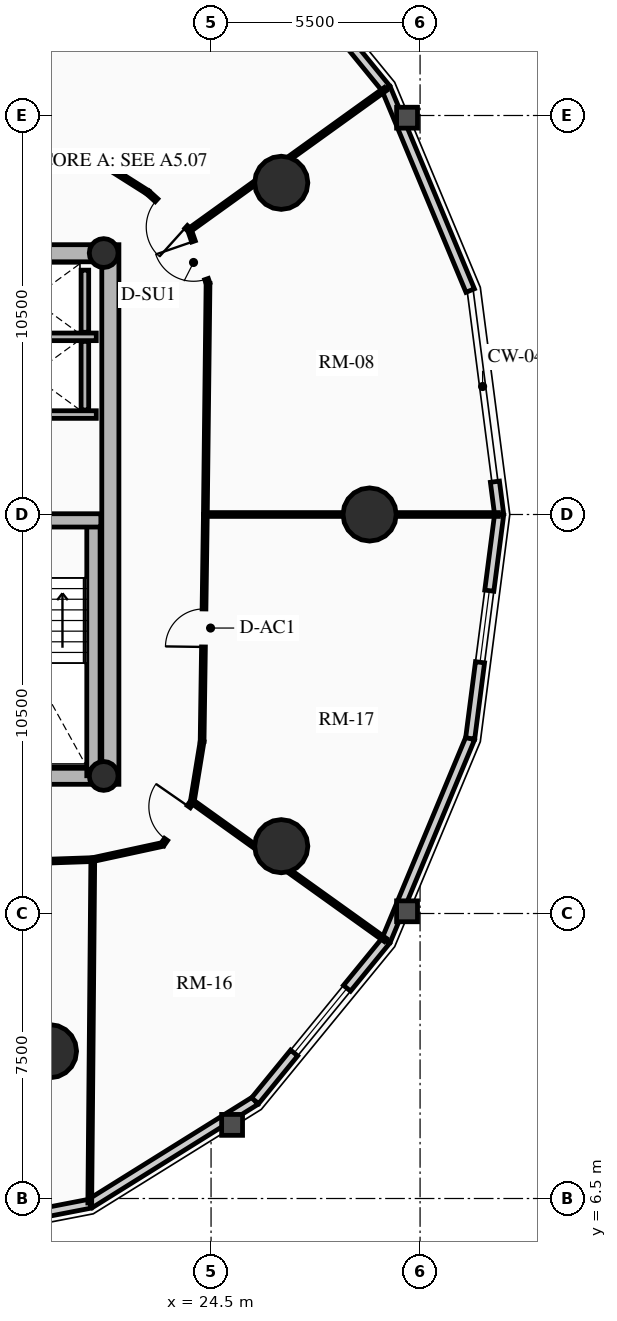
"""IFC4 building model, lengths in metres.
Left out: names, types, materials, properties, quantities, classifications, styles, units other than length and angle.
Written with IfcOpenShell. Run it as: python <this file> out.ifc"""

import sys

from ifc_helpers import new_model, si_unit, direction, frame, frame_2d, origin, origin_2d, place, context, subcontext, project, spatial, rectangle, circle, hollow_circle, extrude, source, transform, mapped, element, fill, save


model = new_model("IFC4")
c1 = context("Model", 3, precision=1e-05, world=origin(), true_north=direction((0.0, 1.0)))
c2 = subcontext(c1, "Body", "Model", "MODEL_VIEW")
j1 = project(units=[si_unit("LENGTHUNIT", "METRE"), si_unit("PLANEANGLEUNIT", "RADIAN")], contexts=[c1])
p1 = place(None, origin())
s1 = spatial("IfcSite", under=j1, at=p1, CompositionType="ELEMENT")
p2 = place(p1, origin())
s2 = spatial("IfcBuilding", under=s1, at=p2, CompositionType="ELEMENT")
p3 = place(p2, frame((0.0, 0.0, 99.25)))
s3 = spatial("IfcBuildingStorey", under=s2, at=p3, CompositionType="ELEMENT", Elevation=99.25)
p4 = place(p3, frame((21.85, 17.4, 0.0), z_axis=(0.0, 0.0, 1.0), x_axis=(0.0, 1.0, 0.0)))
e1 = element("IfcWall", 1, at=p4, inside=s3, PredefinedType="SHEAR", context=c2, shape_type="SweptSolid", body=[
    extrude(rectangle(XDim=14.2, YDim=0.45, at=frame_2d((7.1, 0.0))), origin(), (0.0, 0.0, 1.0), 2.91),
])
p5 = place(p3, frame((11.15, 17.625, 0.0), z_axis=(0.0, 0.0, 1.0), x_axis=(1.0, 0.0, 0.0)))
e2 = element("IfcWall", 2, at=p5, inside=s3, PredefinedType="SHEAR", context=c2, shape_type="SweptSolid", body=[
    extrude(rectangle(XDim=10.7, YDim=0.45, at=frame_2d((5.35, 0.0))), origin(), (0.0, 0.0, 1.0), 2.91),
])
m1 = source(origin(), c2, "Body", "SweptSolid", [
    extrude(rectangle(XDim=1.5, YDim=2.02, at=frame_2d((0.75, 1.01))), frame((0.0, 0.235, 0.0), z_axis=(0.0, -1.0, 0.0), x_axis=(1.0, 0.0, 0.0)), (0.0, 0.0, 1.0), 0.47),
])
p6 = place(p5, frame((5.45, 0.0, 0.0)))
e3 = element("IfcOpeningElement", 3, at=p6, cuts=e2, PredefinedType="OPENING", context=c2, shape_type="MappedRepresentation", body=[
    mapped(m1, transform((0.0, 0.0, 0.0), x_axis=(1.0, 0.0, 0.0), y_axis=(0.0, 1.0, 0.0), z_axis=(0.0, 0.0, 1.0), scale=1.0)),
])
p7 = place(p3, frame((11.15, 31.375, 0.0), z_axis=(0.0, 0.0, 1.0), x_axis=(1.0, 0.0, 0.0)))
e4 = element("IfcWall", 4, at=p7, inside=s3, PredefinedType="SHEAR", context=c2, shape_type="SweptSolid", body=[
    extrude(rectangle(XDim=10.7, YDim=0.45, at=frame_2d((5.35, 0.0))), origin(), (0.0, 0.0, 1.0), 2.91),
])
p8 = place(p7, frame((4.6, 0.0, 0.0)))
e5 = element("IfcOpeningElement", 5, at=p8, cuts=e4, PredefinedType="OPENING", context=c2, shape_type="MappedRepresentation", body=[
    mapped(m1, transform((0.0, 0.0, 0.0), x_axis=(1.0, 0.0, 0.0), y_axis=(0.0, 1.0, 0.0), z_axis=(0.0, 0.0, 1.0), scale=1.0)),
])
p9 = place(p3, frame((21.405, 17.625, 0.0), z_axis=(0.0, 0.0, 1.0), x_axis=(0.0, 1.0, 0.0)))
e6 = element("IfcWall", 6, at=p9, inside=s3, PredefinedType="SHEAR", context=c2, shape_type="SweptSolid", body=[
    extrude(rectangle(XDim=6.72, YDim=0.35, at=frame_2d((3.36, 0.0))), origin(), (0.0, 0.0, 1.0), 2.91),
])
p10 = place(p3, frame((18.315, 24.345, 0.0), z_axis=(0.0, 0.0, 1.0), x_axis=(1.0, 0.0, 0.0)))
e7 = element("IfcWall", 7, at=p10, inside=s3, PredefinedType="SHEAR", context=c2, shape_type="SweptSolid", body=[
    extrude(rectangle(XDim=3.285, YDim=0.35, at=frame_2d((1.643, 0.0))), origin(), (0.0, 0.0, 1.0), 2.91),
])
for number, where, z_axis, x_axis in (
    (8, (21.675, 17.62, 0.0), (0.0, 0.0, 1.0), (1.0, 0.0, 0.0)),
    (9, (21.675, 31.38, 0.0), (0.0, 0.0, 1.0), (1.0, 0.0, 0.0)),
):
    element("IfcColumn", number, at=place(p3, frame(where, z_axis=z_axis, x_axis=x_axis)), inside=s3, PredefinedType="COLUMN", context=c2, shape_type="SweptSolid", body=[
        extrude(hollow_circle(Radius=0.38, WallThickness=0.032, at=origin_2d()), origin(), (0.0, 0.0, 1.0), 2.91),
    ])
for number, where, z_axis, x_axis in (
    (10, (28.672, 24.5, 0.0), (0.0, 0.0, 1.0), (1.0, 0.0, 0.0)),
    (11, (26.347, 33.229, 0.0), (0.0, 0.0, 1.0), (1.0, 0.0, 0.0)),
    (12, (20.261, 10.377, 0.0), (0.0, 0.0, 1.0), (1.0, 0.0, 0.0)),
    (13, (26.347, 15.771, 0.0), (0.0, 0.0, 1.0), (1.0, 0.0, 0.0)),
):
    element("IfcColumn", number, at=place(p3, frame(where, z_axis=z_axis, x_axis=x_axis)), inside=s3, PredefinedType="USERDEFINED", context=c2, shape_type="SweptSolid", body=[
        extrude(circle(Radius=0.7, at=origin_2d()), origin(), (0.0, 0.0, 1.0), 2.91),
    ])
p11 = place(p3, frame((31.969, 25.363, 0.0), z_axis=(0.0, 0.0, 1.0), x_axis=(0.128523364007, -0.991706481225, 0.0)))
e14 = element("IfcWall", 14, at=p11, inside=s3, PredefinedType="SOLIDWALL", context=c2, shape_type="SweptSolid", body=[
    extrude(rectangle(XDim=0.87, YDim=0.24, at=frame_2d((0.435, 0.0))), origin(), (0.0, 0.0, 1.0), 2.655),
])
p12 = place(p3, frame((29.105, 35.709, 0.0), z_axis=(0.0, 0.0, 1.0), x_axis=(0.384344417632, -0.923189779317, 0.0)))
e15 = element("IfcWall", 15, at=p12, inside=s3, PredefinedType="SOLIDWALL", context=c2, shape_type="SweptSolid", body=[
    extrude(rectangle(XDim=5.758, YDim=0.24, at=frame_2d((2.879, 0.0))), origin(), (0.0, 0.0, 1.0), 2.179),
])
p13 = place(p3, frame((25.658, 39.928, 0.0), z_axis=(0.0, 0.0, 1.0), x_axis=(0.632700781152, -0.77439635945, 0.0)))
e16 = element("IfcWall", 16, at=p13, inside=s3, PredefinedType="SOLIDWALL", context=c2, shape_type="SweptSolid", body=[
    extrude(rectangle(XDim=5.448, YDim=0.24, at=frame_2d((2.724, 0.0))), origin(), (0.0, 0.0, 1.0), 2.179),
])
m2 = source(origin(), c2, "Body", "SweptSolid", [
    extrude(rectangle(XDim=2.2, YDim=1.35, at=frame_2d((1.1, 0.675))), frame((0.0, 0.13, 0.0), z_axis=(0.0, -1.0, 0.0), x_axis=(1.0, 0.0, 0.0)), (0.0, 0.0, 1.0), 0.26),
])
p14 = place(p13, frame((1.624, 0.0, 0.65)))
e17 = element("IfcOpeningElement", 17, at=p14, cuts=e16, PredefinedType="OPENING", context=c2, shape_type="MappedRepresentation", body=[
    mapped(m2, transform((0.0, 0.0, 0.0), x_axis=(1.0, 0.0, 0.0), y_axis=(0.0, 1.0, 0.0), z_axis=(0.0, 0.0, 1.0), scale=1.0)),
])
p15 = place(p3, frame((21.315, 6.363, 0.0), z_axis=(0.0, 0.0, 1.0), x_axis=(-0.981723785992, -0.190311344954, 0.0)))
e18 = element("IfcWall", 18, at=p15, inside=s3, PredefinedType="SOLIDWALL", context=c2, shape_type="SweptSolid", body=[
    extrude(rectangle(XDim=4.904, YDim=0.24, at=frame_2d((2.452, 0.0))), origin(), (0.0, 0.0, 1.0), 2.179),
])
m3 = source(origin(), c2, "Body", "SweptSolid", [
    extrude(rectangle(XDim=1.9, YDim=1.35, at=frame_2d((0.95, 0.675))), frame((0.0, 0.13, 0.0), z_axis=(0.0, -1.0, 0.0), x_axis=(1.0, 0.0, 0.0)), (0.0, 0.0, 1.0), 0.26),
])
p16 = place(p15, frame((1.502, 0.0, 0.65)))
e19 = element("IfcOpeningElement", 19, at=p16, cuts=e18, PredefinedType="OPENING", context=c2, shape_type="MappedRepresentation", body=[
    mapped(m3, transform((0.0, 0.0, 0.0), x_axis=(1.0, 0.0, 0.0), y_axis=(0.0, 1.0, 0.0), z_axis=(0.0, 0.0, 1.0), scale=1.0)),
])
p17 = place(p3, frame((25.658, 9.072, 0.0), z_axis=(0.0, 0.0, 1.0), x_axis=(-0.848520380187, -0.529162701263, 0.0)))
e20 = element("IfcWall", 20, at=p17, inside=s3, PredefinedType="SOLIDWALL", context=c2, shape_type="SweptSolid", body=[
    extrude(rectangle(XDim=5.119, YDim=0.24, at=frame_2d((2.56, 0.0))), origin(), (0.0, 0.0, 1.0), 2.179),
])
p18 = place(p3, frame((29.105, 13.291, 0.0), z_axis=(0.0, 0.0, 1.0), x_axis=(-0.632700781152, -0.77439635945, 0.0)))
e21 = element("IfcWall", 21, at=p18, inside=s3, PredefinedType="SOLIDWALL", context=c2, shape_type="SweptSolid", body=[
    extrude(rectangle(XDim=5.448, YDim=0.24, at=frame_2d((2.724, 0.0))), origin(), (0.0, 0.0, 1.0), 2.179),
])
p19 = place(p18, frame((1.624, 0.0, 0.65)))
e22 = element("IfcOpeningElement", 22, at=p19, cuts=e21, PredefinedType="OPENING", context=c2, shape_type="MappedRepresentation", body=[
    mapped(m2, transform((0.0, 0.0, 0.0), x_axis=(1.0, 0.0, 0.0), y_axis=(0.0, 1.0, 0.0), z_axis=(0.0, 0.0, 1.0), scale=1.0)),
])
p20 = place(p3, frame((31.318, 18.607, 0.0), z_axis=(0.0, 0.0, 1.0), x_axis=(-0.384344417632, -0.923189779317, 0.0)))
e23 = element("IfcWall", 23, at=p20, inside=s3, PredefinedType="SOLIDWALL", context=c2, shape_type="SweptSolid", body=[
    extrude(rectangle(XDim=5.758, YDim=0.24, at=frame_2d((2.879, 0.0))), origin(), (0.0, 0.0, 1.0), 2.179),
])
p21 = place(p3, frame((32.081, 24.5, 0.0), z_axis=(0.0, 0.0, 1.0), x_axis=(-0.128351991996, -0.991728675672, 0.0)))
e24 = element("IfcWall", 24, at=p21, inside=s3, PredefinedType="SOLIDWALL", context=c2, shape_type="SweptSolid", body=[
    extrude(rectangle(XDim=5.942, YDim=0.24, at=frame_2d((2.971, 0.0))), origin(), (0.0, 0.0, 1.0), 2.179),
])
p22 = place(p21, frame((2.021, 0.0, 0.65)))
e25 = element("IfcOpeningElement", 25, at=p22, cuts=e24, PredefinedType="OPENING", context=c2, shape_type="MappedRepresentation", body=[
    mapped(m3, transform((0.0, 0.0, 0.0), x_axis=(1.0, 0.0, 0.0), y_axis=(0.0, 1.0, 0.0), z_axis=(0.0, 0.0, 1.0), scale=1.0)),
])
for number, where, z_axis, x_axis in (
    (26, (18.51, 27.13, 0.0), (0.0, 0.0, 1.0), (1.0, 0.0, 0.0)),
    (27, (18.51, 29.175, 0.0), (0.0, 0.0, 1.0), (1.0, 0.0, 0.0)),
):
    element("IfcWall", number, at=place(p3, frame(where, z_axis=z_axis, x_axis=x_axis)), inside=s3, PredefinedType="SHEAR", context=c2, shape_type="SweptSolid", body=[
        extrude(rectangle(XDim=2.97, YDim=0.2, at=frame_2d((1.485, 0.0))), origin(), (0.0, 0.0, 1.0), 2.91),
    ])
p23 = place(p3, frame((21.18, 27.25, 0.0), z_axis=(0.0, 0.0, 1.0), x_axis=(0.0, 1.0, 0.0)))
e28 = element("IfcWall", 28, at=p23, inside=s3, PredefinedType="SHEAR", context=c2, shape_type="SweptSolid", body=[
    extrude(rectangle(XDim=1.805, YDim=0.2, at=frame_2d((0.902, 0.0))), origin(), (0.0, 0.0, 1.0), 2.91),
])
p24 = place(p3, frame((21.18, 29.295, 0.0), z_axis=(0.0, 0.0, 1.0), x_axis=(0.0, 1.0, 0.0)))
e29 = element("IfcWall", 29, at=p24, inside=s3, PredefinedType="SHEAR", context=c2, shape_type="SweptSolid", body=[
    extrude(rectangle(XDim=1.635, YDim=0.2, at=frame_2d((0.817, 0.0))), origin(), (0.0, 0.0, 1.0), 2.91),
])
p25 = place(p3, frame((24.35, 24.5, 0.0), z_axis=(0.0, 0.0, 1.0), x_axis=(0.011520250275, 0.999933639715, 0.0)))
e30 = element("IfcWall", 30, at=p25, inside=s3, PredefinedType="MOVABLE", context=c2, shape_type="SweptSolid", body=[
    extrude(rectangle(XDim=6.082, YDim=0.1, at=frame_2d((3.041, 0.0))), origin(), (0.0, 0.0, 1.0), 2.225),
])
p26 = place(p3, frame((24.42, 30.582, 0.0), z_axis=(0.0, 0.0, 1.0), x_axis=(-0.327437665675, 0.944872782494, 0.0)))
e31 = element("IfcWall", 31, at=p26, inside=s3, PredefinedType="MOVABLE", context=c2, shape_type="SweptSolid", body=[
    extrude(rectangle(XDim=1.487, YDim=0.1, at=frame_2d((0.743, 0.0))), origin(), (0.0, 0.0, 1.0), 2.225),
])
m4 = source(origin(), c2, "Body", "SweptSolid", [
    extrude(rectangle(XDim=1.05, YDim=2.015, at=frame_2d((0.525, 1.007))), frame((0.0, 0.06, 0.0), z_axis=(0.0, -1.0, 0.0), x_axis=(1.0, 0.0, 0.0)), (0.0, 0.0, 1.0), 0.12),
])
p27 = place(p26, frame((0.12, 0.0, 0.0)))
e32 = element("IfcOpeningElement", 32, at=p27, cuts=e31, PredefinedType="OPENING", context=c2, shape_type="MappedRepresentation", body=[
    mapped(m4, transform((0.0, 0.0, 0.0), x_axis=(1.0, 0.0, 0.0), y_axis=(0.0, 1.0, 0.0), z_axis=(0.0, 0.0, 1.0), scale=1.0)),
])
p28 = place(p3, frame((23.933, 31.987, 0.0), z_axis=(0.0, 0.0, 1.0), x_axis=(-0.742471347264, 0.669877823556, 0.0)))
e33 = element("IfcWall", 33, at=p28, inside=s3, PredefinedType="MOVABLE", context=c2, shape_type="SweptSolid", body=[
    extrude(rectangle(XDim=1.476, YDim=0.1, at=frame_2d((0.738, 0.0))), origin(), (0.0, 0.0, 1.0), 2.225),
])
p29 = place(p28, frame((0.12, 0.0, 0.0)))
e34 = element("IfcOpeningElement", 34, at=p29, cuts=e33, PredefinedType="OPENING", context=c2, shape_type="MappedRepresentation", body=[
    mapped(m4, transform((0.0, 0.0, 0.0), x_axis=(1.0, 0.0, 0.0), y_axis=(0.0, 1.0, 0.0), z_axis=(0.0, 0.0, 1.0), scale=1.0)),
])
p30 = place(p3, frame((22.837, 32.976, 0.0), z_axis=(0.0, 0.0, 1.0), x_axis=(-0.844976677144, 0.534803155454, 0.0)))
e35 = element("IfcWall", 35, at=p30, inside=s3, PredefinedType="MOVABLE", context=c2, shape_type="SweptSolid", body=[
    extrude(rectangle(XDim=1.587, YDim=0.1, at=frame_2d((0.793, 0.0))), origin(), (0.0, 0.0, 1.0), 2.225),
])
p31 = place(p3, frame((21.496, 33.824, 0.0), z_axis=(0.0, 0.0, 1.0), x_axis=(-0.999990516754, -0.004355043261, 0.0)))
e36 = element("IfcWall", 36, at=p31, inside=s3, PredefinedType="MOVABLE", context=c2, shape_type="SweptSolid", body=[
    extrude(rectangle(XDim=3.364, YDim=0.1, at=frame_2d((1.682, 0.0))), origin(), (0.0, 0.0, 1.0), 2.225),
])
p32 = place(p3, frame((14.792, 15.191, 0.0), z_axis=(0.0, 0.0, 1.0), x_axis=(0.999405559957, 0.034475015985, 0.0)))
e37 = element("IfcWall", 37, at=p32, inside=s3, PredefinedType="MOVABLE", context=c2, shape_type="SweptSolid", body=[
    extrude(rectangle(XDim=6.6, YDim=0.1, at=frame_2d((3.3, 0.0))), origin(), (0.0, 0.0, 1.0), 2.225),
])
p33 = place(p32, frame((2.775, 0.0, 0.0)))
e38 = element("IfcOpeningElement", 38, at=p33, cuts=e37, PredefinedType="OPENING", context=c2, shape_type="MappedRepresentation", body=[
    mapped(m4, transform((0.0, 0.0, 0.0), x_axis=(1.0, 0.0, 0.0), y_axis=(0.0, 1.0, 0.0), z_axis=(0.0, 0.0, 1.0), scale=1.0)),
])
p34 = place(p3, frame((21.388, 15.418, 0.0), z_axis=(0.0, 0.0, 1.0), x_axis=(0.977297113048, 0.211873435874, 0.0)))
e39 = element("IfcWall", 39, at=p34, inside=s3, PredefinedType="MOVABLE", context=c2, shape_type="SweptSolid", body=[
    extrude(rectangle(XDim=1.877, YDim=0.1, at=frame_2d((0.938, 0.0))), origin(), (0.0, 0.0, 1.0), 2.225),
])
p35 = place(p3, frame((23.222, 15.816, 0.0), z_axis=(0.0, 0.0, 1.0), x_axis=(0.57002280034, 0.821628874306, 0.0)))
e40 = element("IfcWall", 40, at=p35, inside=s3, PredefinedType="MOVABLE", context=c2, shape_type="SweptSolid", body=[
    extrude(rectangle(XDim=1.374, YDim=0.1, at=frame_2d((0.687, 0.0))), origin(), (0.0, 0.0, 1.0), 2.225),
])
p36 = place(p35, frame((0.162, 0.0, 0.0)))
e41 = element("IfcOpeningElement", 41, at=p36, cuts=e40, PredefinedType="OPENING", context=c2, shape_type="MappedRepresentation", body=[
    mapped(m4, transform((0.0, 0.0, 0.0), x_axis=(1.0, 0.0, 0.0), y_axis=(0.0, 1.0, 0.0), z_axis=(0.0, 0.0, 1.0), scale=1.0)),
])
p37 = place(p3, frame((24.006, 16.945, 0.0), z_axis=(0.0, 0.0, 1.0), x_axis=(0.161240753481, 0.986915102436, 0.0)))
e42 = element("IfcWall", 42, at=p37, inside=s3, PredefinedType="MOVABLE", context=c2, shape_type="SweptSolid", body=[
    extrude(rectangle(XDim=1.605, YDim=0.1, at=frame_2d((0.802, 0.0))), origin(), (0.0, 0.0, 1.0), 2.225),
])
p38 = place(p3, frame((24.264, 18.529, 0.0), z_axis=(0.0, 0.0, 1.0), x_axis=(0.014349654938, 0.999897038401, 0.0)))
e43 = element("IfcWall", 43, at=p38, inside=s3, PredefinedType="MOVABLE", context=c2, shape_type="SweptSolid", body=[
    extrude(rectangle(XDim=5.972, YDim=0.1, at=frame_2d((2.986, 0.0))), origin(), (0.0, 0.0, 1.0), 2.655),
])
m5 = source(origin(), c2, "Body", "SweptSolid", [
    extrude(rectangle(XDim=1.0, YDim=2.015, at=frame_2d((0.5, 1.007))), frame((0.0, 0.06, 0.0), z_axis=(0.0, -1.0, 0.0), x_axis=(1.0, 0.0, 0.0)), (0.0, 0.0, 1.0), 0.12),
])
p39 = place(p38, frame((2.486, 0.0, 0.0)))
e44 = element("IfcOpeningElement", 44, at=p39, cuts=e43, PredefinedType="OPENING", context=c2, shape_type="MappedRepresentation", body=[
    mapped(m5, transform((0.0, 0.0, 0.0), x_axis=(1.0, 0.0, 0.0), y_axis=(0.0, 1.0, 0.0), z_axis=(0.0, 0.0, 1.0), scale=1.0)),
])
p40 = place(p3, frame((24.35, 24.5, 0.0), z_axis=(0.0, 0.0, 1.0), x_axis=(1.0, 0.0, 0.0)))
e45 = element("IfcWall", 45, at=p40, inside=s3, PredefinedType="MOVABLE", context=c2, shape_type="SweptSolid", body=[
    extrude(rectangle(XDim=7.711, YDim=0.1, at=frame_2d((3.855, 0.0))), origin(), (0.0, 0.0, 1.0), 2.179),
])
p41 = place(p3, frame((23.933, 31.987, 0.0), z_axis=(0.0, 0.0, 1.0), x_axis=(0.811642946178, 0.584153856377, 0.0)))
e46 = element("IfcWall", 46, at=p41, inside=s3, PredefinedType="MOVABLE", context=c2, shape_type="SweptSolid", body=[
    extrude(rectangle(XDim=6.352, YDim=0.1, at=frame_2d((3.176, 0.0))), origin(), (0.0, 0.0, 1.0), 2.179),
])
p42 = place(p3, frame((21.388, 15.418, 0.0), z_axis=(0.0, 0.0, 1.0), x_axis=(-0.008780834631, -0.999961447728, 0.0)))
e47 = element("IfcWall", 47, at=p42, inside=s3, PredefinedType="MOVABLE", context=c2, shape_type="SweptSolid", body=[
    extrude(rectangle(XDim=9.036, YDim=0.1, at=frame_2d((4.518, 0.0))), origin(), (0.0, 0.0, 1.0), 2.179),
])
p43 = place(p3, frame((24.006, 16.945, 0.0), z_axis=(0.0, 0.0, 1.0), x_axis=(0.81289906925, -0.582404587219, 0.0)))
e48 = element("IfcWall", 48, at=p43, inside=s3, PredefinedType="MOVABLE", context=c2, shape_type="SweptSolid", body=[
    extrude(rectangle(XDim=6.253, YDim=0.1, at=frame_2d((3.127, 0.0))), origin(), (0.0, 0.0, 1.0), 2.179),
])
m6 = source(origin(), c2, "Body", "SweptSolid", [
    extrude(rectangle(XDim=2.2, YDim=1.35, at=frame_2d((1.1, 0.675))), frame((0.0, 0.03, 0.0), z_axis=(0.0, -1.0, 0.0), x_axis=(1.0, 0.0, 0.0)), (0.0, 0.0, 1.0), 0.06),
])
p44 = place(p19, origin())
e49 = element("IfcWindow", 49, at=p44, inside=s3, PartitioningType="DOUBLE_PANEL_VERTICAL", PredefinedType="WINDOW", context=c2, shape_type="MappedRepresentation", body=[
    mapped(m6, transform((0.0, 0.0, 0.0), x_axis=(1.0, 0.0, 0.0), y_axis=(0.0, 1.0, 0.0), z_axis=(0.0, 0.0, 1.0), scale=1.0)),
])
fill(e22, e49)
m7 = source(origin(), c2, "Body", "SweptSolid", [
    extrude(rectangle(XDim=1.9, YDim=1.35, at=frame_2d((0.95, 0.675))), frame((0.0, 0.03, 0.0), z_axis=(0.0, -1.0, 0.0), x_axis=(1.0, 0.0, 0.0)), (0.0, 0.0, 1.0), 0.06),
])
p45 = place(p22, origin())
e50 = element("IfcWindow", 50, at=p45, inside=s3, PartitioningType="DOUBLE_PANEL_VERTICAL", PredefinedType="WINDOW", context=c2, shape_type="MappedRepresentation", body=[
    mapped(m7, transform((0.0, 0.0, 0.0), x_axis=(1.0, 0.0, 0.0), y_axis=(0.0, 1.0, 0.0), z_axis=(0.0, 0.0, 1.0), scale=1.0)),
])
fill(e25, e50)
m8 = source(origin(), c2, "Body", "SweptSolid", [
    extrude(rectangle(XDim=1.05, YDim=2.015, at=frame_2d((0.525, 1.007))), frame((0.0, 0.025, 0.0), z_axis=(0.0, -1.0, 0.0), x_axis=(1.0, 0.0, 0.0)), (0.0, 0.0, 1.0), 0.05),
])
p46 = place(p27, origin())
e51 = element("IfcDoor", 51, at=p46, inside=s3, OperationType="SINGLE_SWING_RIGHT", PredefinedType="DOOR", context=c2, shape_type="MappedRepresentation", body=[
    mapped(m8, transform((0.0, 0.0, 0.0), x_axis=(1.0, 0.0, 0.0), y_axis=(0.0, 1.0, 0.0), z_axis=(0.0, 0.0, 1.0), scale=1.0)),
])
fill(e32, e51)
p47 = place(p29, origin())
e52 = element("IfcDoor", 52, at=p47, inside=s3, OperationType="SINGLE_SWING_LEFT", PredefinedType="DOOR", context=c2, shape_type="MappedRepresentation", body=[
    mapped(m8, transform((0.0, 0.0, 0.0), x_axis=(1.0, 0.0, 0.0), y_axis=(0.0, 1.0, 0.0), z_axis=(0.0, 0.0, 1.0), scale=1.0)),
])
fill(e34, e52)
p48 = place(p36, origin())
e53 = element("IfcDoor", 53, at=p48, inside=s3, OperationType="SINGLE_SWING_RIGHT", PredefinedType="DOOR", context=c2, shape_type="MappedRepresentation", body=[
    mapped(m8, transform((0.0, 0.0, 0.0), x_axis=(1.0, 0.0, 0.0), y_axis=(0.0, 1.0, 0.0), z_axis=(0.0, 0.0, 1.0), scale=1.0)),
])
fill(e41, e53)
m9 = source(origin(), c2, "Body", "SweptSolid", [
    extrude(rectangle(XDim=1.0, YDim=2.015, at=frame_2d((0.5, 1.007))), frame((0.0, 0.025, 0.0), z_axis=(0.0, -1.0, 0.0), x_axis=(1.0, 0.0, 0.0)), (0.0, 0.0, 1.0), 0.05),
])
p49 = place(p39, origin())
e54 = element("IfcDoor", 54, at=p49, inside=s3, OperationType="SINGLE_SWING_LEFT", PredefinedType="DOOR", context=c2, shape_type="MappedRepresentation", body=[
    mapped(m9, transform((0.0, 0.0, 0.0), x_axis=(1.0, 0.0, 0.0), y_axis=(0.0, 1.0, 0.0), z_axis=(0.0, 0.0, 1.0), scale=1.0)),
])
fill(e44, e54)
save(model, sys.argv[1])
